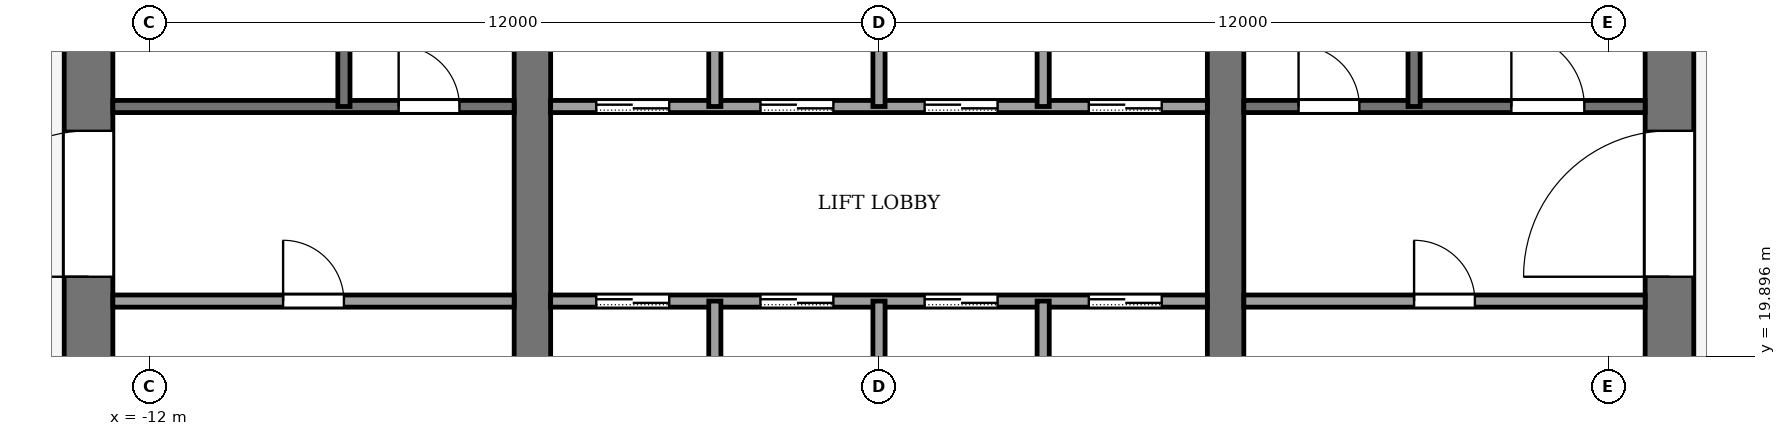
"""IFC4 building model, lengths in metres.
Left out: names, types, materials, properties, quantities, classifications, styles, units other than length and angle.
Written with IfcOpenShell. Run it as: python <this file> out.ifc"""

import sys

from ifc_helpers import new_model, si_unit, direction, frame, frame_2d, origin, place, context, subcontext, project, spatial, rectangle, extrude, element, fill, save


model = new_model("IFC4")
c1 = context("Model", 3, precision=1e-05, world=origin(), true_north=direction((0.0, 1.0)))
c2 = subcontext(c1, "Body", "Model", "MODEL_VIEW")
j1 = project(units=[si_unit("LENGTHUNIT", "METRE"), si_unit("PLANEANGLEUNIT", "RADIAN")], contexts=[c1])
p1 = place(None, origin())
s1 = spatial("IfcSite", under=j1, at=p1, CompositionType="ELEMENT")
p2 = place(p1, origin())
s2 = spatial("IfcBuilding", under=s1, at=p2, CompositionType="ELEMENT")
p3 = place(p2, frame((0.0, 0.0, 238.0)))
s3 = spatial("IfcBuildingStorey", under=s2, at=p3, CompositionType="ELEMENT", Elevation=238.0)
p4 = place(p3, frame((-13.0, 18.4, -0.13), z_axis=(0.0, 0.0, 1.0), x_axis=(0.0, 1.0, 0.0)))
e1 = element("IfcWall", 1, at=p4, inside=s3, PredefinedType="SHEAR", context=c2, shape_type="SweptSolid", body=[
    extrude(rectangle(XDim=19.2, YDim=0.8, at=frame_2d((9.6, 0.0))), origin(), (0.0, 0.0, 1.0), 4.0),
])
p5 = place(p4, frame((2.8, 0.0, 0.13)))
e2 = element("IfcOpeningElement", 2, at=p5, cuts=e1, PredefinedType="OPENING", context=c2, shape_type="SweptSolid", body=[
    extrude(rectangle(XDim=2.4, YDim=2.4, at=frame_2d((1.2, 1.2))), frame((0.0, 0.41, 0.0), z_axis=(0.0, -1.0, 0.0), x_axis=(1.0, 0.0, 0.0)), (0.0, 0.0, 1.0), 0.82),
])
p6 = place(p4, frame((13.4, 0.0, 0.13)))
e3 = element("IfcOpeningElement", 3, at=p6, cuts=e1, PredefinedType="OPENING", context=c2, shape_type="SweptSolid", body=[
    extrude(rectangle(XDim=1.4, YDim=2.2, at=frame_2d((0.7, 1.1))), frame((0.0, 0.41, 0.0), z_axis=(0.0, -1.0, 0.0), x_axis=(1.0, 0.0, 0.0)), (0.0, 0.0, 1.0), 0.82),
])
p7 = place(p3, frame((13.0, 18.4, -0.13), z_axis=(0.0, 0.0, 1.0), x_axis=(0.0, 1.0, 0.0)))
e4 = element("IfcWall", 4, at=p7, inside=s3, PredefinedType="SHEAR", context=c2, shape_type="SweptSolid", body=[
    extrude(rectangle(XDim=19.2, YDim=0.8, at=frame_2d((9.6, 0.0))), origin(), (0.0, 0.0, 1.0), 4.0),
])
p8 = place(p7, frame((2.8, 0.0, 0.13)))
e5 = element("IfcOpeningElement", 5, at=p8, cuts=e4, PredefinedType="OPENING", context=c2, shape_type="SweptSolid", body=[
    extrude(rectangle(XDim=2.4, YDim=2.4, at=frame_2d((1.2, 1.2))), frame((0.0, 0.41, 0.0), z_axis=(0.0, -1.0, 0.0), x_axis=(1.0, 0.0, 0.0)), (0.0, 0.0, 1.0), 0.82),
])
p9 = place(p7, frame((13.3, 0.0, 0.13)))
e6 = element("IfcOpeningElement", 6, at=p9, cuts=e4, PredefinedType="OPENING", context=c2, shape_type="SweptSolid", body=[
    extrude(rectangle(XDim=2.4, YDim=2.4, at=frame_2d((1.2, 1.2))), frame((0.0, 0.41, 0.0), z_axis=(0.0, -1.0, 0.0), x_axis=(1.0, 0.0, 0.0)), (0.0, 0.0, 1.0), 0.82),
])
p10 = place(p3, frame((-5.7, 18.4, -0.13), z_axis=(0.0, 0.0, 1.0), x_axis=(0.0, 1.0, 0.0)))
e7 = element("IfcWall", 7, at=p10, inside=s3, PredefinedType="SHEAR", context=c2, shape_type="SweptSolid", body=[
    extrude(rectangle(XDim=19.2, YDim=0.6, at=frame_2d((9.6, 0.0))), origin(), (0.0, 0.0, 1.0), 4.0),
])
p11 = place(p10, frame((8.35, 0.0, 0.13)))
e8 = element("IfcOpeningElement", 8, at=p11, cuts=e7, PredefinedType="OPENING", context=c2, shape_type="SweptSolid", body=[
    extrude(rectangle(XDim=0.9, YDim=2.1, at=frame_2d((0.45, 1.05))), frame((0.0, 0.31, 0.0), z_axis=(0.0, -1.0, 0.0), x_axis=(1.0, 0.0, 0.0)), (0.0, 0.0, 1.0), 0.62),
])
p12 = place(p3, frame((5.7, 18.4, -0.13), z_axis=(0.0, 0.0, 1.0), x_axis=(0.0, 1.0, 0.0)))
e9 = element("IfcWall", 9, at=p12, inside=s3, PredefinedType="SHEAR", context=c2, shape_type="SweptSolid", body=[
    extrude(rectangle(XDim=19.2, YDim=0.6, at=frame_2d((9.6, 0.0))), origin(), (0.0, 0.0, 1.0), 4.0),
])
p13 = place(p12, frame((13.3, 0.0, 0.13)))
e10 = element("IfcOpeningElement", 10, at=p13, cuts=e9, PredefinedType="OPENING", context=c2, shape_type="SweptSolid", body=[
    extrude(rectangle(XDim=2.4, YDim=2.4, at=frame_2d((1.2, 1.2))), frame((0.0, 0.31, 0.0), z_axis=(0.0, -1.0, 0.0), x_axis=(1.0, 0.0, 0.0)), (0.0, 0.0, 1.0), 0.62),
])
p14 = place(p3, frame((-12.6, 20.8, 0.0), z_axis=(0.0, 0.0, 1.0), x_axis=(1.0, 0.0, 0.0)))
e11 = element("IfcWall", 11, at=p14, inside=s3, PredefinedType="PARTITIONING", context=c2, shape_type="SweptSolid", body=[
    extrude(rectangle(XDim=6.6, YDim=0.2, at=frame_2d((3.3, 0.0))), origin(), (0.0, 0.0, 1.0), 3.87),
])
p15 = place(p14, frame((2.8, 0.0, 0.0)))
e12 = element("IfcOpeningElement", 12, at=p15, cuts=e11, PredefinedType="OPENING", context=c2, shape_type="SweptSolid", body=[
    extrude(rectangle(XDim=1.0, YDim=2.1, at=frame_2d((0.5, 1.05))), frame((0.0, 0.11, 0.0), z_axis=(0.0, -1.0, 0.0), x_axis=(1.0, 0.0, 0.0)), (0.0, 0.0, 1.0), 0.22),
])
p16 = place(p3, frame((-5.4, 20.8, 0.0), z_axis=(0.0, 0.0, 1.0), x_axis=(1.0, 0.0, 0.0)))
e13 = element("IfcWall", 13, at=p16, inside=s3, PredefinedType="PARTITIONING", context=c2, shape_type="SweptSolid", body=[
    extrude(rectangle(XDim=10.8, YDim=0.2, at=frame_2d((5.4, 0.0))), origin(), (0.0, 0.0, 1.0), 3.87),
])
p17 = place(p16, frame((0.75, 0.0, 0.0)))
e14 = element("IfcOpeningElement", 14, at=p17, cuts=e13, PredefinedType="OPENING", context=c2, shape_type="SweptSolid", body=[
    extrude(rectangle(XDim=1.2, YDim=2.2, at=frame_2d((0.6, 1.1))), frame((0.0, 0.11, 0.0), z_axis=(0.0, -1.0, 0.0), x_axis=(1.0, 0.0, 0.0)), (0.0, 0.0, 1.0), 0.22),
])
p18 = place(p16, frame((3.45, 0.0, 0.0)))
e15 = element("IfcOpeningElement", 15, at=p18, cuts=e13, PredefinedType="OPENING", context=c2, shape_type="SweptSolid", body=[
    extrude(rectangle(XDim=1.2, YDim=2.2, at=frame_2d((0.6, 1.1))), frame((0.0, 0.11, 0.0), z_axis=(0.0, -1.0, 0.0), x_axis=(1.0, 0.0, 0.0)), (0.0, 0.0, 1.0), 0.22),
])
p19 = place(p16, frame((6.15, 0.0, 0.0)))
e16 = element("IfcOpeningElement", 16, at=p19, cuts=e13, PredefinedType="OPENING", context=c2, shape_type="SweptSolid", body=[
    extrude(rectangle(XDim=1.2, YDim=2.2, at=frame_2d((0.6, 1.1))), frame((0.0, 0.11, 0.0), z_axis=(0.0, -1.0, 0.0), x_axis=(1.0, 0.0, 0.0)), (0.0, 0.0, 1.0), 0.22),
])
p20 = place(p16, frame((8.85, 0.0, 0.0)))
e17 = element("IfcOpeningElement", 17, at=p20, cuts=e13, PredefinedType="OPENING", context=c2, shape_type="SweptSolid", body=[
    extrude(rectangle(XDim=1.2, YDim=2.2, at=frame_2d((0.6, 1.1))), frame((0.0, 0.11, 0.0), z_axis=(0.0, -1.0, 0.0), x_axis=(1.0, 0.0, 0.0)), (0.0, 0.0, 1.0), 0.22),
])
p21 = place(p3, frame((6.0, 20.8, 0.0), z_axis=(0.0, 0.0, 1.0), x_axis=(1.0, 0.0, 0.0)))
e18 = element("IfcWall", 18, at=p21, inside=s3, PredefinedType="PARTITIONING", context=c2, shape_type="SweptSolid", body=[
    extrude(rectangle(XDim=6.6, YDim=0.2, at=frame_2d((3.3, 0.0))), origin(), (0.0, 0.0, 1.0), 3.87),
])
p22 = place(p21, frame((2.8, 0.0, 0.0)))
e19 = element("IfcOpeningElement", 19, at=p22, cuts=e18, PredefinedType="OPENING", context=c2, shape_type="SweptSolid", body=[
    extrude(rectangle(XDim=1.0, YDim=2.1, at=frame_2d((0.5, 1.05))), frame((0.0, 0.11, 0.0), z_axis=(0.0, -1.0, 0.0), x_axis=(1.0, 0.0, 0.0)), (0.0, 0.0, 1.0), 0.22),
])
p23 = place(p3, frame((-12.6, 24.0, 0.0), z_axis=(0.0, 0.0, 1.0), x_axis=(1.0, 0.0, 0.0)))
e20 = element("IfcWall", 20, at=p23, inside=s3, PredefinedType="PARTITIONING", context=c2, shape_type="SweptSolid", body=[
    extrude(rectangle(XDim=6.6, YDim=0.2, at=frame_2d((3.3, 0.0))), origin(), (0.0, 0.0, 1.0), 3.87),
])
p24 = place(p23, frame((4.7, 0.0, 0.0)))
e21 = element("IfcOpeningElement", 21, at=p24, cuts=e20, PredefinedType="OPENING", context=c2, shape_type="SweptSolid", body=[
    extrude(rectangle(XDim=1.0, YDim=2.1, at=frame_2d((0.5, 1.05))), frame((0.0, 0.11, 0.0), z_axis=(0.0, -1.0, 0.0), x_axis=(1.0, 0.0, 0.0)), (0.0, 0.0, 1.0), 0.22),
])
p25 = place(p3, frame((-5.4, 24.0, 0.0), z_axis=(0.0, 0.0, 1.0), x_axis=(1.0, 0.0, 0.0)))
e22 = element("IfcWall", 22, at=p25, inside=s3, PredefinedType="PARTITIONING", context=c2, shape_type="SweptSolid", body=[
    extrude(rectangle(XDim=10.8, YDim=0.2, at=frame_2d((5.4, 0.0))), origin(), (0.0, 0.0, 1.0), 3.87),
])
p26 = place(p25, frame((0.75, 0.0, 0.0)))
e23 = element("IfcOpeningElement", 23, at=p26, cuts=e22, PredefinedType="OPENING", context=c2, shape_type="SweptSolid", body=[
    extrude(rectangle(XDim=1.2, YDim=2.2, at=frame_2d((0.6, 1.1))), frame((0.0, 0.11, 0.0), z_axis=(0.0, -1.0, 0.0), x_axis=(1.0, 0.0, 0.0)), (0.0, 0.0, 1.0), 0.22),
])
p27 = place(p25, frame((3.45, 0.0, 0.0)))
e24 = element("IfcOpeningElement", 24, at=p27, cuts=e22, PredefinedType="OPENING", context=c2, shape_type="SweptSolid", body=[
    extrude(rectangle(XDim=1.2, YDim=2.2, at=frame_2d((0.6, 1.1))), frame((0.0, 0.11, 0.0), z_axis=(0.0, -1.0, 0.0), x_axis=(1.0, 0.0, 0.0)), (0.0, 0.0, 1.0), 0.22),
])
p28 = place(p25, frame((6.15, 0.0, 0.0)))
e25 = element("IfcOpeningElement", 25, at=p28, cuts=e22, PredefinedType="OPENING", context=c2, shape_type="SweptSolid", body=[
    extrude(rectangle(XDim=1.2, YDim=2.2, at=frame_2d((0.6, 1.1))), frame((0.0, 0.11, 0.0), z_axis=(0.0, -1.0, 0.0), x_axis=(1.0, 0.0, 0.0)), (0.0, 0.0, 1.0), 0.22),
])
p29 = place(p25, frame((8.85, 0.0, 0.0)))
e26 = element("IfcOpeningElement", 26, at=p29, cuts=e22, PredefinedType="OPENING", context=c2, shape_type="SweptSolid", body=[
    extrude(rectangle(XDim=1.2, YDim=2.2, at=frame_2d((0.6, 1.1))), frame((0.0, 0.11, 0.0), z_axis=(0.0, -1.0, 0.0), x_axis=(1.0, 0.0, 0.0)), (0.0, 0.0, 1.0), 0.22),
])
p30 = place(p3, frame((6.0, 24.0, 0.0), z_axis=(0.0, 0.0, 1.0), x_axis=(1.0, 0.0, 0.0)))
e27 = element("IfcWall", 27, at=p30, inside=s3, PredefinedType="PARTITIONING", context=c2, shape_type="SweptSolid", body=[
    extrude(rectangle(XDim=6.6, YDim=0.2, at=frame_2d((3.3, 0.0))), origin(), (0.0, 0.0, 1.0), 3.87),
])
p31 = place(p30, frame((0.9, 0.0, 0.0)))
e28 = element("IfcOpeningElement", 28, at=p31, cuts=e27, PredefinedType="OPENING", context=c2, shape_type="SweptSolid", body=[
    extrude(rectangle(XDim=1.0, YDim=2.1, at=frame_2d((0.5, 1.05))), frame((0.0, 0.11, 0.0), z_axis=(0.0, -1.0, 0.0), x_axis=(1.0, 0.0, 0.0)), (0.0, 0.0, 1.0), 0.22),
])
p32 = place(p30, frame((4.4, 0.0, 0.0)))
e29 = element("IfcOpeningElement", 29, at=p32, cuts=e27, PredefinedType="OPENING", context=c2, shape_type="SweptSolid", body=[
    extrude(rectangle(XDim=1.2, YDim=2.2, at=frame_2d((0.6, 1.1))), frame((0.0, 0.11, 0.0), z_axis=(0.0, -1.0, 0.0), x_axis=(1.0, 0.0, 0.0)), (0.0, 0.0, 1.0), 0.22),
])
p33 = place(p3, frame((-8.8, 24.0, 0.0), z_axis=(0.0, 0.0, 1.0), x_axis=(0.0, 1.0, 0.0)))
e30 = element("IfcWall", 30, at=p33, inside=s3, PredefinedType="PARTITIONING", context=c2, shape_type="SweptSolid", body=[
    extrude(rectangle(XDim=7.4, YDim=0.2, at=frame_2d((3.7, 0.0))), origin(), (0.0, 0.0, 1.0), 3.87),
])
p34 = place(p3, frame((-2.7, 18.4, 0.0), z_axis=(0.0, 0.0, 1.0), x_axis=(0.0, 1.0, 0.0)))
e31 = element("IfcWall", 31, at=p34, inside=s3, PredefinedType="PARTITIONING", context=c2, shape_type="SweptSolid", body=[
    extrude(rectangle(XDim=2.4, YDim=0.2, at=frame_2d((1.2, 0.0))), origin(), (0.0, 0.0, 1.0), 3.87),
])
p35 = place(p3, frame((-2.7, 24.0, 0.0), z_axis=(0.0, 0.0, 1.0), x_axis=(0.0, 1.0, 0.0)))
e32 = element("IfcWall", 32, at=p35, inside=s3, PredefinedType="PARTITIONING", context=c2, shape_type="SweptSolid", body=[
    extrude(rectangle(XDim=2.4, YDim=0.2, at=frame_2d((1.2, 0.0))), origin(), (0.0, 0.0, 1.0), 3.87),
])
p36 = place(p3, frame((0.0, 18.4, 0.0), z_axis=(0.0, 0.0, 1.0), x_axis=(0.0, 1.0, 0.0)))
e33 = element("IfcWall", 33, at=p36, inside=s3, PredefinedType="PARTITIONING", context=c2, shape_type="SweptSolid", body=[
    extrude(rectangle(XDim=2.4, YDim=0.2, at=frame_2d((1.2, 0.0))), origin(), (0.0, 0.0, 1.0), 3.87),
])
p37 = place(p3, frame((0.0, 24.0, 0.0), z_axis=(0.0, 0.0, 1.0), x_axis=(0.0, 1.0, 0.0)))
e34 = element("IfcWall", 34, at=p37, inside=s3, PredefinedType="PARTITIONING", context=c2, shape_type="SweptSolid", body=[
    extrude(rectangle(XDim=2.4, YDim=0.2, at=frame_2d((1.2, 0.0))), origin(), (0.0, 0.0, 1.0), 3.87),
])
p38 = place(p3, frame((2.7, 18.4, 0.0), z_axis=(0.0, 0.0, 1.0), x_axis=(0.0, 1.0, 0.0)))
e35 = element("IfcWall", 35, at=p38, inside=s3, PredefinedType="PARTITIONING", context=c2, shape_type="SweptSolid", body=[
    extrude(rectangle(XDim=2.4, YDim=0.2, at=frame_2d((1.2, 0.0))), origin(), (0.0, 0.0, 1.0), 3.87),
])
p39 = place(p3, frame((2.7, 24.0, 0.0), z_axis=(0.0, 0.0, 1.0), x_axis=(0.0, 1.0, 0.0)))
e36 = element("IfcWall", 36, at=p39, inside=s3, PredefinedType="PARTITIONING", context=c2, shape_type="SweptSolid", body=[
    extrude(rectangle(XDim=2.4, YDim=0.2, at=frame_2d((1.2, 0.0))), origin(), (0.0, 0.0, 1.0), 3.87),
])
p40 = place(p3, frame((8.8, 24.0, 0.0), z_axis=(0.0, 0.0, 1.0), x_axis=(0.0, 1.0, 0.0)))
e37 = element("IfcWall", 37, at=p40, inside=s3, PredefinedType="PARTITIONING", context=c2, shape_type="SweptSolid", body=[
    extrude(rectangle(XDim=7.4, YDim=0.2, at=frame_2d((3.7, 0.0))), origin(), (0.0, 0.0, 1.0), 3.87),
])
p41 = place(p17, origin())
e38 = element("IfcDoor", 38, at=p41, inside=s3, OperationType="SLIDING_TO_LEFT", PredefinedType="DOOR", context=c2, shape_type="SweptSolid", body=[
    extrude(rectangle(XDim=1.2, YDim=2.2, at=frame_2d((0.6, 1.1))), frame((0.0, 0.025, 0.0), z_axis=(0.0, -1.0, 0.0), x_axis=(1.0, 0.0, 0.0)), (0.0, 0.0, 1.0), 0.05),
])
fill(e14, e38)
p42 = place(p18, origin())
e39 = element("IfcDoor", 39, at=p42, inside=s3, OperationType="SLIDING_TO_LEFT", PredefinedType="DOOR", context=c2, shape_type="SweptSolid", body=[
    extrude(rectangle(XDim=1.2, YDim=2.2, at=frame_2d((0.6, 1.1))), frame((0.0, 0.025, 0.0), z_axis=(0.0, -1.0, 0.0), x_axis=(1.0, 0.0, 0.0)), (0.0, 0.0, 1.0), 0.05),
])
fill(e15, e39)
p43 = place(p19, origin())
e40 = element("IfcDoor", 40, at=p43, inside=s3, OperationType="SLIDING_TO_LEFT", PredefinedType="DOOR", context=c2, shape_type="SweptSolid", body=[
    extrude(rectangle(XDim=1.2, YDim=2.2, at=frame_2d((0.6, 1.1))), frame((0.0, 0.025, 0.0), z_axis=(0.0, -1.0, 0.0), x_axis=(1.0, 0.0, 0.0)), (0.0, 0.0, 1.0), 0.05),
])
fill(e16, e40)
p44 = place(p20, origin())
e41 = element("IfcDoor", 41, at=p44, inside=s3, OperationType="SLIDING_TO_LEFT", PredefinedType="DOOR", context=c2, shape_type="SweptSolid", body=[
    extrude(rectangle(XDim=1.2, YDim=2.2, at=frame_2d((0.6, 1.1))), frame((0.0, 0.025, 0.0), z_axis=(0.0, -1.0, 0.0), x_axis=(1.0, 0.0, 0.0)), (0.0, 0.0, 1.0), 0.05),
])
fill(e17, e41)
p45 = place(p26, origin())
e42 = element("IfcDoor", 42, at=p45, inside=s3, OperationType="SLIDING_TO_LEFT", PredefinedType="DOOR", context=c2, shape_type="SweptSolid", body=[
    extrude(rectangle(XDim=1.2, YDim=2.2, at=frame_2d((0.6, 1.1))), frame((0.0, 0.025, 0.0), z_axis=(0.0, -1.0, 0.0), x_axis=(1.0, 0.0, 0.0)), (0.0, 0.0, 1.0), 0.05),
])
fill(e23, e42)
p46 = place(p27, origin())
e43 = element("IfcDoor", 43, at=p46, inside=s3, OperationType="SLIDING_TO_LEFT", PredefinedType="DOOR", context=c2, shape_type="SweptSolid", body=[
    extrude(rectangle(XDim=1.2, YDim=2.2, at=frame_2d((0.6, 1.1))), frame((0.0, 0.025, 0.0), z_axis=(0.0, -1.0, 0.0), x_axis=(1.0, 0.0, 0.0)), (0.0, 0.0, 1.0), 0.05),
])
fill(e24, e43)
p47 = place(p28, origin())
e44 = element("IfcDoor", 44, at=p47, inside=s3, OperationType="SLIDING_TO_LEFT", PredefinedType="DOOR", context=c2, shape_type="SweptSolid", body=[
    extrude(rectangle(XDim=1.2, YDim=2.2, at=frame_2d((0.6, 1.1))), frame((0.0, 0.025, 0.0), z_axis=(0.0, -1.0, 0.0), x_axis=(1.0, 0.0, 0.0)), (0.0, 0.0, 1.0), 0.05),
])
fill(e25, e44)
p48 = place(p29, origin())
e45 = element("IfcDoor", 45, at=p48, inside=s3, OperationType="SLIDING_TO_LEFT", PredefinedType="DOOR", context=c2, shape_type="SweptSolid", body=[
    extrude(rectangle(XDim=1.2, YDim=2.2, at=frame_2d((0.6, 1.1))), frame((0.0, 0.025, 0.0), z_axis=(0.0, -1.0, 0.0), x_axis=(1.0, 0.0, 0.0)), (0.0, 0.0, 1.0), 0.05),
])
fill(e26, e45)
p49 = place(p15, origin())
e46 = element("IfcDoor", 46, at=p49, inside=s3, OperationType="SINGLE_SWING_LEFT", PredefinedType="DOOR", context=c2, shape_type="SweptSolid", body=[
    extrude(rectangle(XDim=1.0, YDim=2.1, at=frame_2d((0.5, 1.05))), frame((0.0, 0.025, 0.0), z_axis=(0.0, -1.0, 0.0), x_axis=(1.0, 0.0, 0.0)), (0.0, 0.0, 1.0), 0.05),
])
fill(e12, e46)
p50 = place(p22, origin())
e47 = element("IfcDoor", 47, at=p50, inside=s3, OperationType="SINGLE_SWING_RIGHT", PredefinedType="DOOR", context=c2, shape_type="SweptSolid", body=[
    extrude(rectangle(XDim=1.0, YDim=2.1, at=frame_2d((0.5, 1.05))), frame((0.0, 0.025, 0.0), z_axis=(0.0, -1.0, 0.0), x_axis=(1.0, 0.0, 0.0)), (0.0, 0.0, 1.0), 0.05),
])
fill(e19, e47)
p51 = place(p24, origin())
e48 = element("IfcDoor", 48, at=p51, inside=s3, OperationType="SINGLE_SWING_RIGHT", PredefinedType="DOOR", context=c2, shape_type="SweptSolid", body=[
    extrude(rectangle(XDim=1.0, YDim=2.1, at=frame_2d((0.5, 1.05))), frame((0.0, 0.025, 0.0), z_axis=(0.0, -1.0, 0.0), x_axis=(1.0, 0.0, 0.0)), (0.0, 0.0, 1.0), 0.05),
])
fill(e21, e48)
p52 = place(p31, origin())
e49 = element("IfcDoor", 49, at=p52, inside=s3, OperationType="SINGLE_SWING_LEFT", PredefinedType="DOOR", context=c2, shape_type="SweptSolid", body=[
    extrude(rectangle(XDim=1.0, YDim=2.1, at=frame_2d((0.5, 1.05))), frame((0.0, 0.025, 0.0), z_axis=(0.0, -1.0, 0.0), x_axis=(1.0, 0.0, 0.0)), (0.0, 0.0, 1.0), 0.05),
])
fill(e28, e49)
p53 = place(p32, origin())
e50 = element("IfcDoor", 50, at=p53, inside=s3, OperationType="SINGLE_SWING_LEFT", PredefinedType="DOOR", context=c2, shape_type="SweptSolid", body=[
    extrude(rectangle(XDim=1.2, YDim=2.2, at=frame_2d((0.6, 1.1))), frame((0.0, 0.025, 0.0), z_axis=(0.0, -1.0, 0.0), x_axis=(1.0, 0.0, 0.0)), (0.0, 0.0, 1.0), 0.05),
])
fill(e29, e50)
p54 = place(p5, origin())
e51 = element("IfcDoor", 51, at=p54, inside=s3, OperationType="DOUBLE_DOOR_SINGLE_SWING", PredefinedType="DOOR", context=c2, shape_type="SweptSolid", body=[
    extrude(rectangle(XDim=2.4, YDim=2.4, at=frame_2d((1.2, 1.2))), frame((0.0, 0.025, 0.0), z_axis=(0.0, -1.0, 0.0), x_axis=(1.0, 0.0, 0.0)), (0.0, 0.0, 1.0), 0.05),
])
fill(e2, e51)
p55 = place(p8, origin())
e52 = element("IfcDoor", 52, at=p55, inside=s3, OperationType="DOUBLE_DOOR_SINGLE_SWING", PredefinedType="DOOR", context=c2, shape_type="SweptSolid", body=[
    extrude(rectangle(XDim=2.4, YDim=2.4, at=frame_2d((1.2, 1.2))), frame((0.0, 0.025, 0.0), z_axis=(0.0, -1.0, 0.0), x_axis=(1.0, 0.0, 0.0)), (0.0, 0.0, 1.0), 0.05),
])
fill(e5, e52)
save(model, sys.argv[1])
